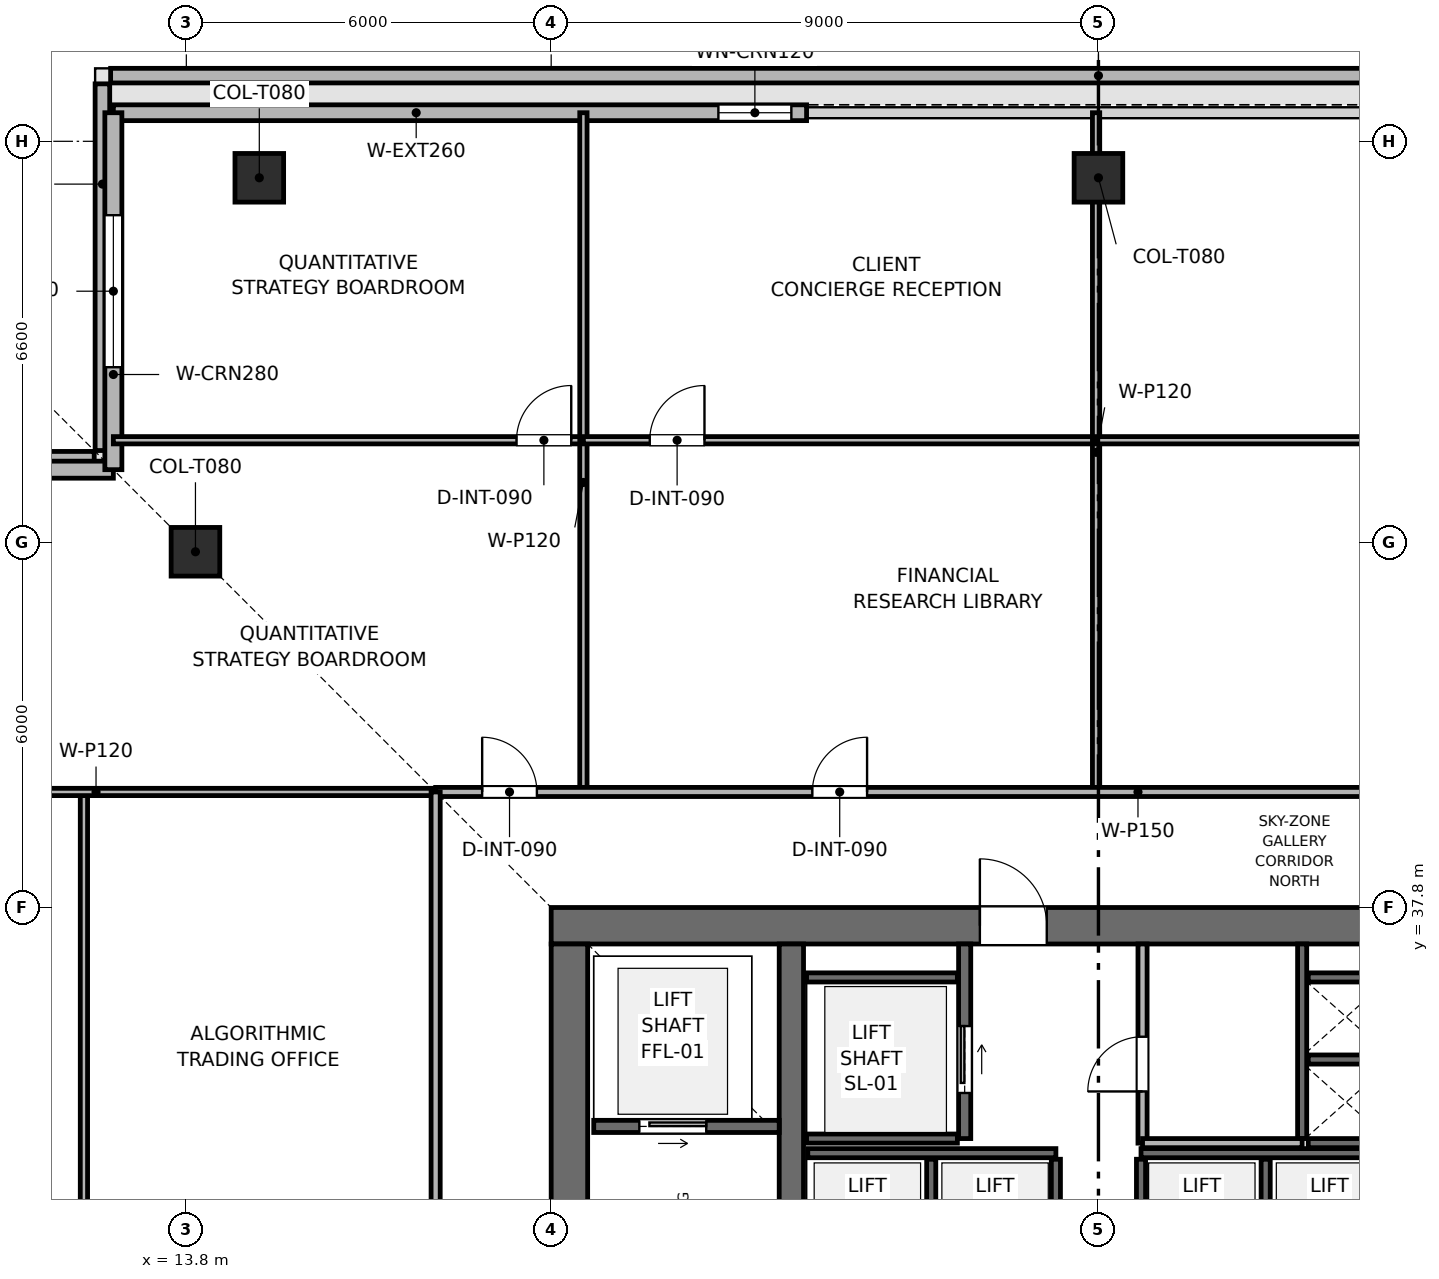
"""IFC4 building model, lengths in metres.
Left out: names, types, materials, properties, quantities, classifications, styles, units other than length and angle.
Written with IfcOpenShell. Run it as: python <this file> out.ifc"""

import sys

from ifc_helpers import new_model, si_unit, direction, frame, frame_2d, origin, origin_2d, place, context, subcontext, project, spatial, rectangle, extrude, element, fill, save


model = new_model("IFC4")
c1 = context("Model", 3, precision=1e-05, world=origin(), true_north=direction((0.0, 1.0)))
c2 = subcontext(c1, "Body", "Model", "MODEL_VIEW")
j1 = project(units=[si_unit("LENGTHUNIT", "METRE"), si_unit("PLANEANGLEUNIT", "RADIAN")], contexts=[c1])
p1 = place(None, origin())
s1 = spatial("IfcSite", under=j1, at=p1, CompositionType="ELEMENT")
p2 = place(p1, origin())
s2 = spatial("IfcBuilding", under=s1, at=p2, CompositionType="ELEMENT")
p3 = place(p2, frame((0.0, 0.0, 333.0)))
s3 = spatial("IfcBuildingStorey", under=s2, at=p3, CompositionType="ELEMENT", Elevation=333.0)
p4 = place(p3, frame((19.8, 37.5, 0.0), z_axis=(0.0, 0.0, 1.0), x_axis=(1.0, 0.0, 0.0)))
e1 = element("IfcWall", 1, at=p4, inside=s3, PredefinedType="SHEAR", context=c2, shape_type="SweptSolid", body=[
    extrude(rectangle(XDim=18.0, YDim=0.6, at=frame_2d((9.0, 0.0))), origin(), (0.0, 0.0, 1.0), 3.75),
])
p5 = place(p4, frame((7.05, 0.0, 0.0)))
e2 = element("IfcOpeningElement", 2, at=p5, cuts=e1, PredefinedType="OPENING", context=c2, shape_type="SweptSolid", body=[
    extrude(rectangle(XDim=1.1, YDim=2.15, at=frame_2d((0.55, 1.075))), frame((0.0, 0.31, 0.0), z_axis=(0.0, -1.0, 0.0), x_axis=(1.0, 0.0, 0.0)), (0.0, 0.0, 1.0), 0.62),
])
p6 = place(p3, frame((20.1, 20.4, 0.0), z_axis=(0.0, 0.0, 1.0), x_axis=(0.0, 1.0, 0.0)))
e3 = element("IfcWall", 3, at=p6, inside=s3, PredefinedType="SHEAR", context=c2, shape_type="SweptSolid", body=[
    extrude(rectangle(XDim=16.8, YDim=0.6, at=frame_2d((8.4, 0.0))), origin(), (0.0, 0.0, 1.0), 3.75),
])
p7 = place(p6, frame((10.4, 0.0, 0.0)))
e4 = element("IfcOpeningElement", 4, at=p7, cuts=e3, PredefinedType="OPENING", context=c2, shape_type="SweptSolid", body=[
    extrude(rectangle(XDim=1.1, YDim=2.15, at=frame_2d((0.55, 1.075))), frame((0.0, 0.31, 0.0), z_axis=(0.0, -1.0, 0.0), x_axis=(1.0, 0.0, 0.0)), (0.0, 0.0, 1.0), 0.62),
])
p8 = place(p3, frame((23.75, 20.4, 0.0), z_axis=(0.0, 0.0, 1.0), x_axis=(0.0, 1.0, 0.0)))
e5 = element("IfcWall", 5, at=p8, inside=s3, PredefinedType="SHEAR", context=c2, shape_type="SweptSolid", body=[
    extrude(rectangle(XDim=16.8, YDim=0.4, at=frame_2d((8.4, 0.0))), origin(), (0.0, 0.0, 1.0), 3.75),
])
for number, where, z_axis, x_axis in (
    (6, (28.8, 49.8, 0.003), (0.0, 0.0, 1.0), (1.0, 0.0, 0.0)),
    (7, (15.0, 49.8, 0.003), (0.0, 0.0, 1.0), (1.0, 0.0, 0.0)),
    (8, (13.95, 43.65, 0.003), (0.0, 0.0, 1.0), (1.0, 0.0, 0.0)),
):
    element("IfcColumn", number, at=place(p3, frame(where, z_axis=z_axis, x_axis=x_axis)), inside=s3, PredefinedType="COLUMN", context=c2, shape_type="SweptSolid", body=[
        extrude(rectangle(XDim=0.8, YDim=0.8, at=origin_2d()), origin(), (0.0, 0.0, 1.0), 3.504),
    ])
p9 = place(p3, frame((45.045, 51.48, 0.0), z_axis=(0.0, 0.0, 1.0), x_axis=(-1.0, 0.0, 0.0)))
e9 = element("IfcWall", 9, at=p9, inside=s3, PredefinedType="PARAPET", context=c2, shape_type="SweptSolid", body=[
    extrude(rectangle(XDim=32.49, YDim=0.24, at=frame_2d((16.245, 0.0))), origin(), (0.0, 0.0, 1.0), 1.2),
])
for number, where, z_axis, x_axis in (
    (10, (12.42, 51.345, 0.0), (0.0, 0.0, 1.0), (0.0, -1.0, 0.0)),
    (11, (12.285, 45.18, 0.0), (0.0, 0.0, 1.0), (-1.0, 0.0, 0.0)),
):
    element("IfcWall", number, at=place(p3, frame(where, z_axis=z_axis, x_axis=x_axis)), inside=s3, PredefinedType="PARAPET", context=c2, shape_type="SweptSolid", body=[
        extrude(rectangle(XDim=6.03, YDim=0.24, at=frame_2d((3.015, 0.0))), origin(), (0.0, 0.0, 1.0), 1.2),
    ])
p10 = place(p3, frame((12.6, 50.87, 0.0), z_axis=(0.0, 0.0, 1.0), x_axis=(1.0, 0.0, 0.0)))
e12 = element("IfcWall", 12, at=p10, inside=s3, PredefinedType="SOLIDWALL", context=c2, shape_type="SweptSolid", body=[
    extrude(rectangle(XDim=11.4, YDim=0.26, at=frame_2d((5.7, 0.0))), origin(), (0.0, 0.0, 1.0), 3.51),
])
p11 = place(p10, frame((9.95, 0.0, 0.9)))
e13 = element("IfcOpeningElement", 13, at=p11, cuts=e12, PredefinedType="OPENING", context=c2, shape_type="SweptSolid", body=[
    extrude(rectangle(XDim=1.2, YDim=2.1, at=frame_2d((0.6, 1.05))), frame((0.0, 0.14, 0.0), z_axis=(0.0, -1.0, 0.0), x_axis=(1.0, 0.0, 0.0)), (0.0, 0.0, 1.0), 0.28),
])
p12 = place(p3, frame((6.73, 45.0, 0.0), z_axis=(0.0, 0.0, 1.0), x_axis=(1.0, 0.0, 0.0)))
e14 = element("IfcWall", 14, at=p12, inside=s3, PredefinedType="SOLIDWALL", context=c2, shape_type="SweptSolid", body=[
    extrude(rectangle(XDim=5.87, YDim=0.28, at=frame_2d((2.935, 0.0))), origin(), (0.0, 0.0, 1.0), 3.51),
])
p13 = place(p12, frame((1.685, 0.0, 0.9)))
e15 = element("IfcOpeningElement", 15, at=p13, cuts=e14, PredefinedType="OPENING", context=c2, shape_type="SweptSolid", body=[
    extrude(rectangle(XDim=2.5, YDim=1.9, at=frame_2d((1.25, 0.95))), frame((0.0, 0.15, 0.0), z_axis=(0.0, -1.0, 0.0), x_axis=(1.0, 0.0, 0.0)), (0.0, 0.0, 1.0), 0.3),
])
p14 = place(p3, frame((12.6, 45.0, 0.0), z_axis=(0.0, 0.0, 1.0), x_axis=(0.0, 1.0, 0.0)))
e16 = element("IfcWall", 16, at=p14, inside=s3, PredefinedType="SOLIDWALL", context=c2, shape_type="SweptSolid", body=[
    extrude(rectangle(XDim=5.87, YDim=0.28, at=frame_2d((2.935, 0.0))), origin(), (0.0, 0.0, 1.0), 3.51),
])
p15 = place(p14, frame((1.685, 0.0, 0.9)))
e17 = element("IfcOpeningElement", 17, at=p15, cuts=e16, PredefinedType="OPENING", context=c2, shape_type="SweptSolid", body=[
    extrude(rectangle(XDim=2.5, YDim=1.9, at=frame_2d((1.25, 0.95))), frame((0.0, 0.15, 0.0), z_axis=(0.0, -1.0, 0.0), x_axis=(1.0, 0.0, 0.0)), (0.0, 0.0, 1.0), 0.3),
])
p16 = place(p3, frame((32.15, 34.0, 0.0), z_axis=(0.0, 0.0, 1.0), x_axis=(0.0, 1.0, 0.0)))
e18 = element("IfcWall", 18, at=p16, inside=s3, PredefinedType="SHEAR", context=c2, shape_type="SweptSolid", body=[
    extrude(rectangle(XDim=3.2, YDim=0.15, at=frame_2d((1.6, 0.0))), origin(), (0.0, 0.0, 1.0), 3.51),
])
for number, where, z_axis, x_axis in (
    (19, (32.25, 33.925, 0.0), (0.0, 0.0, 1.0), (1.0, 0.0, 0.0)),
    (20, (32.25, 35.3, 0.0), (0.0, 0.0, 1.0), (1.0, 0.0, 0.0)),
):
    element("IfcWall", number, at=place(p3, frame(where, z_axis=z_axis, x_axis=x_axis)), inside=s3, PredefinedType="SHEAR", context=c2, shape_type="SweptSolid", body=[
        extrude(rectangle(XDim=1.33, YDim=0.15, at=frame_2d((0.665, 0.0))), origin(), (0.0, 0.0, 1.0), 3.51),
    ])
p17 = place(p3, frame((20.5, 34.2, 0.0), z_axis=(0.0, 0.0, 1.0), x_axis=(1.0, 0.0, 0.0)))
e21 = element("IfcWall", 21, at=p17, inside=s3, PredefinedType="SHEAR", context=c2, shape_type="SweptSolid", body=[
    extrude(rectangle(XDim=3.05, YDim=0.2, at=frame_2d((1.525, 0.0))), origin(), (0.0, 0.0, 1.0), 3.51),
])
p18 = place(p17, frame((0.75, 0.0, 0.0)))
e22 = element("IfcOpeningElement", 22, at=p18, cuts=e21, PredefinedType="OPENING", context=c2, shape_type="SweptSolid", body=[
    extrude(rectangle(XDim=1.1, YDim=2.15, at=frame_2d((0.55, 1.075))), frame((0.0, 0.11, 0.0), z_axis=(0.0, -1.0, 0.0), x_axis=(1.0, 0.0, 0.0)), (0.0, 0.0, 1.0), 0.22),
])
p19 = place(p3, frame((26.6, 34.0, 0.0), z_axis=(0.0, 0.0, 1.0), x_axis=(0.0, 1.0, 0.0)))
e23 = element("IfcWall", 23, at=p19, inside=s3, PredefinedType="SHEAR", context=c2, shape_type="SweptSolid", body=[
    extrude(rectangle(XDim=3.2, YDim=0.2, at=frame_2d((1.6, 0.0))), origin(), (0.0, 0.0, 1.0), 3.51),
])
p20 = place(p19, frame((0.75, 0.0, 0.0)))
e24 = element("IfcOpeningElement", 24, at=p20, cuts=e23, PredefinedType="OPENING", context=c2, shape_type="SweptSolid", body=[
    extrude(rectangle(XDim=1.1, YDim=2.15, at=frame_2d((0.55, 1.075))), frame((0.0, 0.11, 0.0), z_axis=(0.0, -1.0, 0.0), x_axis=(1.0, 0.0, 0.0)), (0.0, 0.0, 1.0), 0.22),
])
for number, where, z_axis, x_axis in (
    (25, (24.0, 34.0, 0.0), (0.0, 0.0, 1.0), (1.0, 0.0, 0.0)),
    (26, (24.0, 36.65, 0.0), (0.0, 0.0, 1.0), (1.0, 0.0, 0.0)),
):
    element("IfcWall", number, at=place(p3, frame(where, z_axis=z_axis, x_axis=x_axis)), inside=s3, PredefinedType="SHEAR", context=c2, shape_type="SweptSolid", body=[
        extrude(rectangle(XDim=2.48, YDim=0.15, at=frame_2d((1.24, 0.0))), origin(), (0.0, 0.0, 1.0), 3.51),
    ])
p21 = place(p3, frame((32.25, 36.65, 0.0), z_axis=(0.0, 0.0, 1.0), x_axis=(1.0, 0.0, 0.0)))
e27 = element("IfcWall", 27, at=p21, inside=s3, PredefinedType="SHEAR", context=c2, shape_type="SweptSolid", body=[
    extrude(rectangle(XDim=1.33, YDim=0.15, at=frame_2d((0.665, 0.0))), origin(), (0.0, 0.0, 1.0), 3.51),
])
for number, where, z_axis, x_axis in (
    (28, (24.02, 33.76, 0.0), (0.0, 0.0, 1.0), (1.0, 0.0, 0.0)),
    (29, (29.5, 33.76, 0.0), (0.0, 0.0, 1.0), (1.0, 0.0, 0.0)),
):
    element("IfcWall", number, at=place(p3, frame(where, z_axis=z_axis, x_axis=x_axis)), inside=s3, PredefinedType="SHEAR", context=c2, shape_type="SweptSolid", body=[
        extrude(rectangle(XDim=4.08, YDim=0.15, at=frame_2d((2.04, 0.0))), origin(), (0.0, 0.0, 1.0), 3.51),
    ])
for number, where, z_axis, x_axis in (
    (30, (26.05, 31.42, 0.0), (0.0, 0.0, 1.0), (0.0, 1.0, 0.0)),
    (31, (28.1, 31.42, 0.0), (0.0, 0.0, 1.0), (0.0, 1.0, 0.0)),
    (32, (29.5, 31.42, 0.0), (0.0, 0.0, 1.0), (0.0, 1.0, 0.0)),
    (33, (31.55, 31.42, 0.0), (0.0, 0.0, 1.0), (0.0, 1.0, 0.0)),
):
    element("IfcWall", number, at=place(p3, frame(where, z_axis=z_axis, x_axis=x_axis)), inside=s3, PredefinedType="SHEAR", context=c2, shape_type="SweptSolid", body=[
        extrude(rectangle(XDim=2.24, YDim=0.15, at=frame_2d((1.12, 0.0))), origin(), (0.0, 0.0, 1.0), 3.51),
    ])
p22 = place(p3, frame((29.525, 33.925, 0.0), z_axis=(0.0, 0.0, 1.0), x_axis=(0.0, 1.0, 0.0)))
e34 = element("IfcWall", 34, at=p22, inside=s3, PredefinedType="PARTITIONING", context=c2, shape_type="SweptSolid", body=[
    extrude(rectangle(XDim=3.275, YDim=0.15, at=frame_2d((1.637, 0.0))), origin(), (0.0, 0.0, 1.0), 3.51),
])
p23 = place(p22, frame((0.85, 0.0, 0.0)))
e35 = element("IfcOpeningElement", 35, at=p23, cuts=e34, PredefinedType="OPENING", context=c2, shape_type="SweptSolid", body=[
    extrude(rectangle(XDim=0.9, YDim=2.1, at=frame_2d((0.45, 1.05))), frame((0.0, 0.085, 0.0), z_axis=(0.0, -1.0, 0.0), x_axis=(1.0, 0.0, 0.0)), (0.0, 0.0, 1.0), 0.17),
])
p24 = place(p3, frame((29.525, 33.925, 0.0), z_axis=(0.0, 0.0, 1.0), x_axis=(1.0, 0.0, 0.0)))
e36 = element("IfcWall", 36, at=p24, inside=s3, PredefinedType="PARTITIONING", context=c2, shape_type="SweptSolid", body=[
    extrude(rectangle(XDim=2.625, YDim=0.15, at=frame_2d((1.312, 0.0))), origin(), (0.0, 0.0, 1.0), 3.51),
])
p25 = place(p3, frame((12.6, 45.484, 0.0), z_axis=(0.0, 0.0, 1.0), x_axis=(1.0, 0.0, 0.0)))
e37 = element("IfcWall", 37, at=p25, inside=s3, PredefinedType="PARTITIONING", context=c2, shape_type="SweptSolid", body=[
    extrude(rectangle(XDim=7.73, YDim=0.12, at=frame_2d((3.865, 0.0))), origin(), (0.0, 0.0, 1.0), 3.095),
])
p26 = place(p25, frame((6.63, 0.0, 0.0)))
e38 = element("IfcOpeningElement", 38, at=p26, cuts=e37, PredefinedType="OPENING", context=c2, shape_type="SweptSolid", body=[
    extrude(rectangle(XDim=0.9, YDim=2.1, at=frame_2d((0.45, 1.05))), frame((0.0, 0.07, 0.0), z_axis=(0.0, -1.0, 0.0), x_axis=(1.0, 0.0, 0.0)), (0.0, 0.0, 1.0), 0.14),
])
p27 = place(p3, frame((20.33, 39.7, 0.0), z_axis=(0.0, 0.0, 1.0), x_axis=(0.0, 1.0, 0.0)))
e39 = element("IfcWall", 39, at=p27, inside=s3, PredefinedType="PARTITIONING", context=c2, shape_type="SweptSolid", body=[
    extrude(rectangle(XDim=11.17, YDim=0.12, at=frame_2d((5.585, 0.0))), origin(), (0.0, 0.0, 1.0), 3.095),
])
p28 = place(p3, frame((20.33, 45.484, 0.0), z_axis=(0.0, 0.0, 1.0), x_axis=(1.0, 0.0, 0.0)))
e40 = element("IfcWall", 40, at=p28, inside=s3, PredefinedType="PARTITIONING", context=c2, shape_type="SweptSolid", body=[
    extrude(rectangle(XDim=8.431, YDim=0.12, at=frame_2d((4.215, 0.0))), origin(), (0.0, 0.0, 1.0), 3.095),
])
p29 = place(p28, frame((1.091, 0.0, 0.0)))
e41 = element("IfcOpeningElement", 41, at=p29, cuts=e40, PredefinedType="OPENING", context=c2, shape_type="SweptSolid", body=[
    extrude(rectangle(XDim=0.9, YDim=2.1, at=frame_2d((0.45, 1.05))), frame((0.0, 0.07, 0.0), z_axis=(0.0, -1.0, 0.0), x_axis=(1.0, 0.0, 0.0)), (0.0, 0.0, 1.0), 0.14),
])
p30 = place(p3, frame((28.761, 39.7, 0.0), z_axis=(0.0, 0.0, 1.0), x_axis=(0.0, 1.0, 0.0)))
e42 = element("IfcWall", 42, at=p30, inside=s3, PredefinedType="PARTITIONING", context=c2, shape_type="SweptSolid", body=[
    extrude(rectangle(XDim=11.17, YDim=0.12, at=frame_2d((5.585, 0.0))), origin(), (0.0, 0.0, 1.0), 2.995),
])
p31 = place(p3, frame((28.761, 45.484, 0.0), z_axis=(0.0, 0.0, 1.0), x_axis=(1.0, 0.0, 0.0)))
e43 = element("IfcWall", 43, at=p31, inside=s3, PredefinedType="PARTITIONING", context=c2, shape_type="SweptSolid", body=[
    extrude(rectangle(XDim=16.239, YDim=0.12, at=frame_2d((8.12, 0.0))), origin(), (0.0, 0.0, 1.0), 3.095),
])
p32 = place(p31, frame((6.425, 0.0, 0.0)))
e44 = element("IfcOpeningElement", 44, at=p32, cuts=e43, PredefinedType="OPENING", context=c2, shape_type="SweptSolid", body=[
    extrude(rectangle(XDim=0.9, YDim=2.1, at=frame_2d((0.45, 1.05))), frame((0.0, 0.07, 0.0), z_axis=(0.0, -1.0, 0.0), x_axis=(1.0, 0.0, 0.0)), (0.0, 0.0, 1.0), 0.14),
])
p33 = place(p3, frame((12.116, 12.6, 0.0), z_axis=(0.0, 0.0, 1.0), x_axis=(0.0, 1.0, 0.0)))
e45 = element("IfcWall", 45, at=p33, inside=s3, PredefinedType="PARTITIONING", context=c2, shape_type="SweptSolid", body=[
    extrude(rectangle(XDim=27.1, YDim=0.12, at=frame_2d((13.55, 0.0))), origin(), (0.0, 0.0, 1.0), 3.095),
])
p34 = place(p33, frame((8.8, 0.0, 0.0)))
e46 = element("IfcOpeningElement", 46, at=p34, cuts=e45, PredefinedType="OPENING", context=c2, shape_type="SweptSolid", body=[
    extrude(rectangle(XDim=0.9, YDim=2.1, at=frame_2d((0.45, 1.05))), frame((0.0, 0.07, 0.0), z_axis=(0.0, -1.0, 0.0), x_axis=(1.0, 0.0, 0.0)), (0.0, 0.0, 1.0), 0.14),
])
p35 = place(p3, frame((6.73, 39.7, 0.0), z_axis=(0.0, 0.0, 1.0), x_axis=(1.0, 0.0, 0.0)))
e47 = element("IfcWall", 47, at=p35, inside=s3, PredefinedType="PARTITIONING", context=c2, shape_type="SweptSolid", body=[
    extrude(rectangle(XDim=11.17, YDim=0.12, at=frame_2d((5.585, 0.0))), origin(), (0.0, 0.0, 1.0), 3.095),
])
p36 = place(p3, frame((17.9, 39.7, 0.0), z_axis=(0.0, 0.0, 1.0), x_axis=(1.0, 0.0, 0.0)))
e48 = element("IfcWall", 48, at=p36, inside=s3, PredefinedType="PARTITIONING", context=c2, shape_type="SweptSolid", body=[
    extrude(rectangle(XDim=21.8, YDim=0.15, at=frame_2d((10.9, 0.0))), origin(), (0.0, 0.0, 1.0), 3.095),
])
p37 = place(p36, frame((0.765, 0.0, 0.0)))
e49 = element("IfcOpeningElement", 49, at=p37, cuts=e48, PredefinedType="OPENING", context=c2, shape_type="SweptSolid", body=[
    extrude(rectangle(XDim=0.9, YDim=2.1, at=frame_2d((0.45, 1.05))), frame((0.0, 0.085, 0.0), z_axis=(0.0, -1.0, 0.0), x_axis=(1.0, 0.0, 0.0)), (0.0, 0.0, 1.0), 0.17),
])
p38 = place(p36, frame((6.195, 0.0, 0.0)))
e50 = element("IfcOpeningElement", 50, at=p38, cuts=e48, PredefinedType="OPENING", context=c2, shape_type="SweptSolid", body=[
    extrude(rectangle(XDim=0.9, YDim=2.1, at=frame_2d((0.45, 1.05))), frame((0.0, 0.085, 0.0), z_axis=(0.0, -1.0, 0.0), x_axis=(1.0, 0.0, 0.0)), (0.0, 0.0, 1.0), 0.17),
])
p39 = place(p36, frame((15.88, 0.0, 0.0)))
e51 = element("IfcOpeningElement", 51, at=p39, cuts=e48, PredefinedType="OPENING", context=c2, shape_type="SweptSolid", body=[
    extrude(rectangle(XDim=0.9, YDim=2.1, at=frame_2d((0.45, 1.05))), frame((0.0, 0.085, 0.0), z_axis=(0.0, -1.0, 0.0), x_axis=(1.0, 0.0, 0.0)), (0.0, 0.0, 1.0), 0.17),
])
p40 = place(p3, frame((17.9, 12.6, 0.0), z_axis=(0.0, 0.0, 1.0), x_axis=(0.0, 1.0, 0.0)))
e52 = element("IfcWall", 52, at=p40, inside=s3, PredefinedType="PARTITIONING", context=c2, shape_type="SweptSolid", body=[
    extrude(rectangle(XDim=27.1, YDim=0.15, at=frame_2d((13.55, 0.0))), origin(), (0.0, 0.0, 1.0), 3.095),
])
p41 = place(p40, frame((13.1, 0.0, 0.0)))
e53 = element("IfcOpeningElement", 53, at=p41, cuts=e52, PredefinedType="OPENING", context=c2, shape_type="SweptSolid", body=[
    extrude(rectangle(XDim=0.9, YDim=2.1, at=frame_2d((0.45, 1.05))), frame((0.0, 0.085, 0.0), z_axis=(0.0, -1.0, 0.0), x_axis=(1.0, 0.0, 0.0)), (0.0, 0.0, 1.0), 0.17),
])
p42 = place(p11, origin())
e54 = element("IfcWindow", 54, at=p42, inside=s3, PartitioningType="SINGLE_PANEL", PredefinedType="WINDOW", context=c2, shape_type="SweptSolid", body=[
    extrude(rectangle(XDim=1.2, YDim=2.1, at=frame_2d((0.6, 1.05))), frame((0.0, 0.03, 0.0), z_axis=(0.0, -1.0, 0.0), x_axis=(1.0, 0.0, 0.0)), (0.0, 0.0, 1.0), 0.06),
])
fill(e13, e54)
p43 = place(p15, origin())
e55 = element("IfcWindow", 55, at=p43, inside=s3, PartitioningType="SINGLE_PANEL", PredefinedType="WINDOW", context=c2, shape_type="SweptSolid", body=[
    extrude(rectangle(XDim=2.5, YDim=1.9, at=frame_2d((1.25, 0.95))), frame((0.0, 0.03, 0.0), z_axis=(0.0, -1.0, 0.0), x_axis=(1.0, 0.0, 0.0)), (0.0, 0.0, 1.0), 0.06),
])
fill(e17, e55)
p44 = place(p18, origin())
e56 = element("IfcDoor", 56, at=p44, inside=s3, OperationType="SLIDING_TO_RIGHT", PredefinedType="DOOR", context=c2, shape_type="SweptSolid", body=[
    extrude(rectangle(XDim=1.1, YDim=2.15, at=frame_2d((0.55, 1.075))), frame((0.0, 0.025, 0.0), z_axis=(0.0, -1.0, 0.0), x_axis=(1.0, 0.0, 0.0)), (0.0, 0.0, 1.0), 0.05),
])
fill(e22, e56)
p45 = place(p20, origin())
e57 = element("IfcDoor", 57, at=p45, inside=s3, OperationType="SLIDING_TO_RIGHT", PredefinedType="DOOR", context=c2, shape_type="SweptSolid", body=[
    extrude(rectangle(XDim=1.1, YDim=2.15, at=frame_2d((0.55, 1.075))), frame((0.0, 0.025, 0.0), z_axis=(0.0, -1.0, 0.0), x_axis=(1.0, 0.0, 0.0)), (0.0, 0.0, 1.0), 0.05),
])
fill(e24, e57)
p46 = place(p23, origin())
e58 = element("IfcDoor", 58, at=p46, inside=s3, OperationType="SINGLE_SWING_LEFT", PredefinedType="DOOR", context=c2, shape_type="SweptSolid", body=[
    extrude(rectangle(XDim=0.9, YDim=2.1, at=frame_2d((0.45, 1.05))), frame((0.0, 0.025, 0.0), z_axis=(0.0, -1.0, 0.0), x_axis=(1.0, 0.0, 0.0)), (0.0, 0.0, 1.0), 0.05),
])
fill(e35, e58)
p47 = place(p26, origin())
e59 = element("IfcDoor", 59, at=p47, inside=s3, OperationType="SINGLE_SWING_RIGHT", PredefinedType="DOOR", context=c2, shape_type="SweptSolid", body=[
    extrude(rectangle(XDim=0.9, YDim=2.1, at=frame_2d((0.45, 1.05))), frame((0.0, 0.025, 0.0), z_axis=(0.0, -1.0, 0.0), x_axis=(1.0, 0.0, 0.0)), (0.0, 0.0, 1.0), 0.05),
])
fill(e38, e59)
p48 = place(p29, origin())
e60 = element("IfcDoor", 60, at=p48, inside=s3, OperationType="SINGLE_SWING_RIGHT", PredefinedType="DOOR", context=c2, shape_type="SweptSolid", body=[
    extrude(rectangle(XDim=0.9, YDim=2.1, at=frame_2d((0.45, 1.05))), frame((0.0, 0.025, 0.0), z_axis=(0.0, -1.0, 0.0), x_axis=(1.0, 0.0, 0.0)), (0.0, 0.0, 1.0), 0.05),
])
fill(e41, e60)
p49 = place(p37, origin())
e61 = element("IfcDoor", 61, at=p49, inside=s3, OperationType="SINGLE_SWING_LEFT", PredefinedType="DOOR", context=c2, shape_type="SweptSolid", body=[
    extrude(rectangle(XDim=0.9, YDim=2.1, at=frame_2d((0.45, 1.05))), frame((0.0, 0.025, 0.0), z_axis=(0.0, -1.0, 0.0), x_axis=(1.0, 0.0, 0.0)), (0.0, 0.0, 1.0), 0.05),
])
fill(e49, e61)
p50 = place(p38, origin())
e62 = element("IfcDoor", 62, at=p50, inside=s3, OperationType="SINGLE_SWING_RIGHT", PredefinedType="DOOR", context=c2, shape_type="SweptSolid", body=[
    extrude(rectangle(XDim=0.9, YDim=2.1, at=frame_2d((0.45, 1.05))), frame((0.0, 0.025, 0.0), z_axis=(0.0, -1.0, 0.0), x_axis=(1.0, 0.0, 0.0)), (0.0, 0.0, 1.0), 0.05),
])
fill(e50, e62)
p51 = place(p5, origin())
e63 = element("IfcDoor", 63, at=p51, inside=s3, OperationType="SINGLE_SWING_LEFT", PredefinedType="DOOR", context=c2, shape_type="SweptSolid", body=[
    extrude(rectangle(XDim=1.1, YDim=2.15, at=frame_2d((0.55, 1.075))), frame((0.0, 0.025, 0.0), z_axis=(0.0, -1.0, 0.0), x_axis=(1.0, 0.0, 0.0)), (0.0, 0.0, 1.0), 0.05),
])
fill(e2, e63)
save(model, sys.argv[1])
